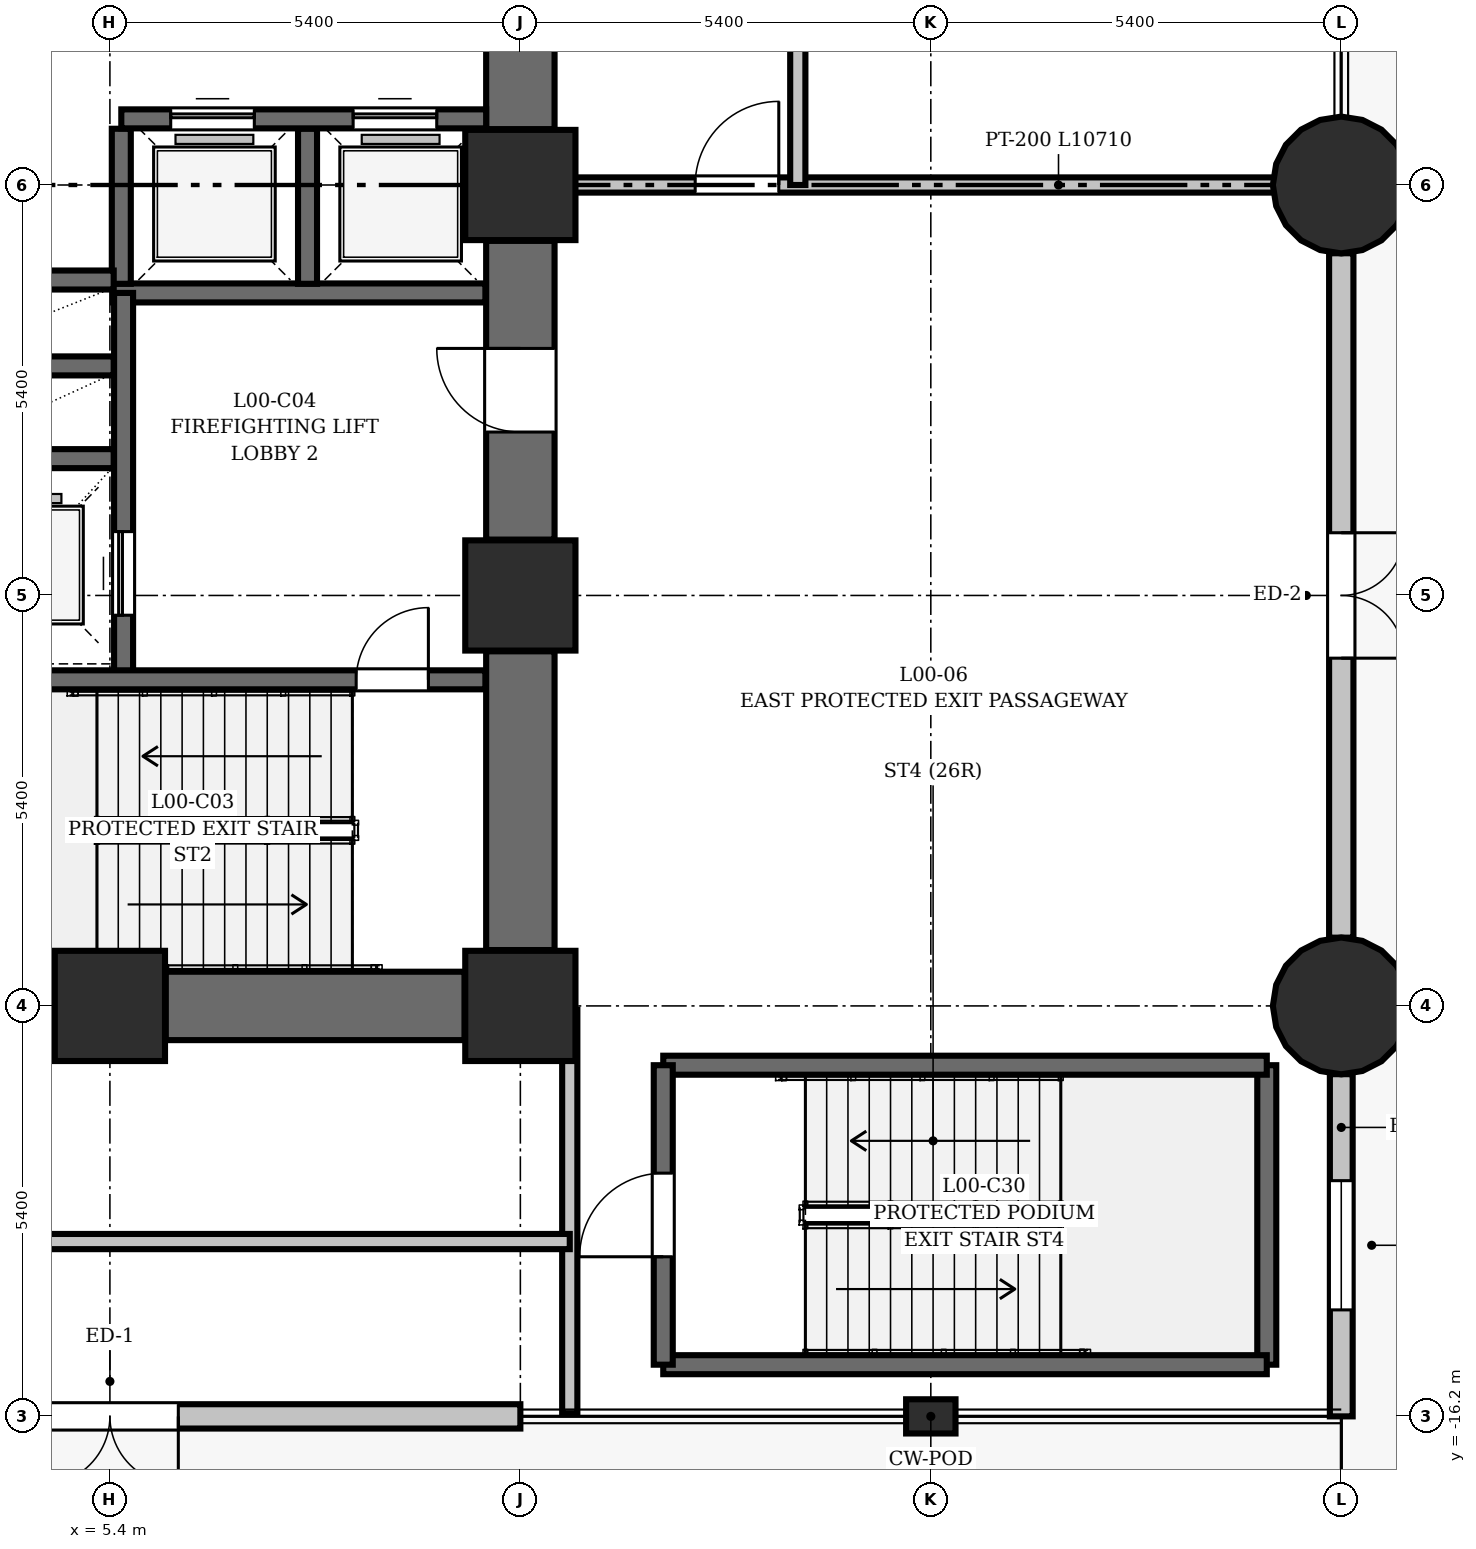
"""IFC4 building model, lengths in metres.
Left out: names, types, materials, properties, quantities, classifications, styles, units other than length and angle.
Written with IfcOpenShell. Run it as: python <this file> out.ifc"""

import sys

from ifc_helpers import new_model, si_unit, direction, frame, frame_2d, origin, origin_2d, place, context, subcontext, project, spatial, rectangle, circle, extrude, element, fill, save


model = new_model("IFC4")
c1 = context("Model", 3, precision=1e-05, world=origin(), true_north=direction((0.0, 1.0)))
c2 = subcontext(c1, "Body", "Model", "MODEL_VIEW")
j1 = project(units=[si_unit("LENGTHUNIT", "METRE"), si_unit("PLANEANGLEUNIT", "RADIAN")], contexts=[c1])
p1 = place(None, origin())
s1 = spatial("IfcSite", under=j1, at=p1, CompositionType="ELEMENT")
p2 = place(p1, origin())
s2 = spatial("IfcBuilding", under=s1, at=p2, CompositionType="ELEMENT")
p3 = place(p2, origin())
s3 = spatial("IfcBuildingStorey", under=s2, at=p3, CompositionType="ELEMENT", Elevation=0.0)
for number, where, z_axis, x_axis in (
    (1, (5.4, -10.8, 0.0), (0.0, 0.0, 1.0), (1.0, 0.0, 0.0)),
    (2, (10.8, -10.8, 0.0), (0.0, 0.0, 1.0), (1.0, 0.0, 0.0)),
    (3, (10.8, -5.4, 0.0), (0.0, 0.0, 1.0), (1.0, 0.0, 0.0)),
    (4, (10.8, 0.0, 0.0), (0.0, 0.0, 1.0), (1.0, 0.0, 0.0)),
):
    element("IfcColumn", number, at=place(p3, frame(where, z_axis=z_axis, x_axis=x_axis)), inside=s3, PredefinedType="COLUMN", context=c2, shape_type="SweptSolid", body=[
        extrude(rectangle(XDim=1.45, YDim=1.45, at=origin_2d()), origin(), (0.0, 0.0, 1.0), 4.5),
    ])
for number, where, z_axis, x_axis in (
    (5, (21.6, -10.8, 0.0), (0.0, 0.0, 1.0), (1.0, 0.0, 0.0)),
    (6, (21.6, 0.0, 0.0), (0.0, 0.0, 1.0), (1.0, 0.0, 0.0)),
):
    element("IfcColumn", number, at=place(p3, frame(where, z_axis=z_axis, x_axis=x_axis)), inside=s3, PredefinedType="COLUMN", context=c2, shape_type="SweptSolid", body=[
        extrude(circle(Radius=0.9, at=origin_2d()), origin(), (0.0, 0.0, 1.0), 4.5),
    ])
p4 = place(p3, frame((16.2, -16.2, 0.0), z_axis=(0.0, 0.0, 1.0), x_axis=(1.0, 0.0, 0.0)))
e7 = element("IfcColumn", 7, at=p4, inside=s3, PredefinedType="PILASTER", context=c2, shape_type="SweptSolid", body=[
    extrude(rectangle(XDim=0.65, YDim=0.45, at=origin_2d()), origin(), (0.0, 0.0, 1.0), 4.5),
])
p5 = place(p3, frame((10.8, -10.065, 0.0), z_axis=(0.0, 0.0, 1.0), x_axis=(0.0, 1.0, 0.0)))
e8 = element("IfcWall", 8, at=p5, inside=s3, PredefinedType="SHEAR", context=c2, shape_type="SweptSolid", body=[
    extrude(rectangle(XDim=3.93, YDim=0.9, at=frame_2d((1.965, 0.0))), origin(), (0.0, 0.0, 1.0), 4.5),
])
p6 = place(p3, frame((10.8, -4.665, 0.0), z_axis=(0.0, 0.0, 1.0), x_axis=(0.0, 1.0, 0.0)))
e9 = element("IfcWall", 9, at=p6, inside=s3, PredefinedType="SHEAR", context=c2, shape_type="SweptSolid", body=[
    extrude(rectangle(XDim=3.93, YDim=0.9, at=frame_2d((1.965, 0.0))), origin(), (0.0, 0.0, 1.0), 4.5),
])
p7 = place(p6, frame((1.415, 0.0, 0.0)))
e10 = element("IfcOpeningElement", 10, at=p7, cuts=e9, PredefinedType="OPENING", context=c2, shape_type="SweptSolid", body=[
    extrude(rectangle(XDim=1.1, YDim=2.1, at=frame_2d((0.55, 1.05))), frame((0.0, 0.46, 0.0), z_axis=(0.0, -1.0, 0.0), x_axis=(1.0, 0.0, 0.0)), (0.0, 0.0, 1.0), 0.92),
])
p8 = place(p3, frame((0.735, -10.8, 0.0), z_axis=(0.0, 0.0, 1.0), x_axis=(1.0, 0.0, 0.0)))
e11 = element("IfcWall", 11, at=p8, inside=s3, PredefinedType="SHEAR", context=c2, shape_type="SweptSolid", body=[
    extrude(rectangle(XDim=3.93, YDim=0.9, at=frame_2d((1.965, 0.0))), origin(), (0.0, 0.0, 1.0), 4.5),
])
p9 = place(p3, frame((10.8, 0.735, 0.0), z_axis=(0.0, 0.0, 1.0), x_axis=(0.0, 1.0, 0.0)))
e12 = element("IfcWall", 12, at=p9, inside=s3, PredefinedType="SHEAR", context=c2, shape_type="SweptSolid", body=[
    extrude(rectangle(XDim=3.93, YDim=0.9, at=frame_2d((1.965, 0.0))), origin(), (0.0, 0.0, 1.0), 4.5),
])
p10 = place(p9, frame((1.415, 0.0, 0.0)))
e13 = element("IfcOpeningElement", 13, at=p10, cuts=e12, PredefinedType="OPENING", context=c2, shape_type="SweptSolid", body=[
    extrude(rectangle(XDim=1.1, YDim=2.1, at=frame_2d((0.55, 1.05))), frame((0.0, 0.46, 0.0), z_axis=(0.0, -1.0, 0.0), x_axis=(1.0, 0.0, 0.0)), (0.0, 0.0, 1.0), 0.92),
])
p11 = place(p3, frame((6.135, -10.8, 0.0), z_axis=(0.0, 0.0, 1.0), x_axis=(1.0, 0.0, 0.0)))
e14 = element("IfcWall", 14, at=p11, inside=s3, PredefinedType="SHEAR", context=c2, shape_type="SweptSolid", body=[
    extrude(rectangle(XDim=3.93, YDim=0.9, at=frame_2d((1.965, 0.0))), origin(), (0.0, 0.0, 1.0), 4.5),
])
p12 = place(p3, frame((10.8, -16.2, 0.0), z_axis=(0.0, 0.0, 1.0), x_axis=(-1.0, 0.0, 0.0)))
e15 = element("IfcWall", 15, at=p12, inside=s3, PredefinedType="STANDARD", context=c2, shape_type="SweptSolid", body=[
    extrude(rectangle(XDim=10.8, YDim=0.32, at=frame_2d((5.4, 0.0))), origin(), (0.0, 0.0, 1.0), 3.329),
])
p13 = place(p12, frame((4.5, 0.0, 0.0)))
e16 = element("IfcOpeningElement", 16, at=p13, cuts=e15, PredefinedType="OPENING", context=c2, shape_type="SweptSolid", body=[
    extrude(rectangle(XDim=1.8, YDim=2.35, at=frame_2d((0.9, 1.175))), frame((0.0, 0.17, 0.0), z_axis=(0.0, -1.0, 0.0), x_axis=(1.0, 0.0, 0.0)), (0.0, 0.0, 1.0), 0.34),
])
p14 = place(p3, frame((21.6, -0.898, 0.0), z_axis=(0.0, 0.0, 1.0), x_axis=(0.0, -1.0, 0.0)))
e17 = element("IfcWall", 17, at=p14, inside=s3, PredefinedType="STANDARD", context=c2, shape_type="SweptSolid", body=[
    extrude(rectangle(XDim=9.004, YDim=0.32, at=frame_2d((4.502, 0.0))), origin(), (0.0, 0.0, 1.0), 3.329),
])
p15 = place(p14, frame((3.677, 0.0, 0.0)))
e18 = element("IfcOpeningElement", 18, at=p15, cuts=e17, PredefinedType="OPENING", context=c2, shape_type="SweptSolid", body=[
    extrude(rectangle(XDim=1.65, YDim=2.3, at=frame_2d((0.825, 1.15))), frame((0.0, 0.17, 0.0), z_axis=(0.0, -1.0, 0.0), x_axis=(1.0, 0.0, 0.0)), (0.0, 0.0, 1.0), 0.34),
])
p16 = place(p3, frame((21.6, -11.698, 0.0), z_axis=(0.0, 0.0, 1.0), x_axis=(0.0, -1.0, 0.0)))
e19 = element("IfcWall", 19, at=p16, inside=s3, PredefinedType="STANDARD", context=c2, shape_type="SweptSolid", body=[
    extrude(rectangle(XDim=4.502, YDim=0.3, at=frame_2d((2.251, 0.0))), origin(), (0.0, 0.0, 1.0), 3.329),
])
p17 = place(p16, frame((1.401, 0.0, 0.8)))
e20 = element("IfcOpeningElement", 20, at=p17, cuts=e19, PredefinedType="OPENING", context=c2, shape_type="SweptSolid", body=[
    extrude(rectangle(XDim=1.7, YDim=1.85, at=frame_2d((0.85, 0.925))), frame((0.0, 0.16, 0.0), z_axis=(0.0, -1.0, 0.0), x_axis=(1.0, 0.0, 0.0)), (0.0, 0.0, 1.0), 0.32),
])
p18 = place(p3, frame((5.44, -1.42, 0.0), z_axis=(0.0, 0.0, 1.0), x_axis=(1.0, 0.0, 0.0)))
e21 = element("IfcWall", 21, at=p18, inside=s3, PredefinedType="SHEAR", context=c2, shape_type="SweptSolid", body=[
    extrude(rectangle(XDim=4.9, YDim=0.25, at=frame_2d((2.45, 0.0))), origin(), (0.0, 0.0, 1.0), 4.5),
])
p19 = place(p3, frame((3.08, -3.6, 0.0), z_axis=(0.0, 0.0, 1.0), x_axis=(1.0, 0.0, 0.0)))
e22 = element("IfcWall", 22, at=p19, inside=s3, PredefinedType="SHEAR", context=c2, shape_type="SweptSolid", body=[
    extrude(rectangle(XDim=2.37, YDim=0.25, at=frame_2d((1.185, 0.0))), origin(), (0.0, 0.0, 1.0), 4.5),
])
p20 = place(p3, frame((5.58, -6.51, 0.0), z_axis=(0.0, 0.0, 1.0), x_axis=(0.0, 1.0, 0.0)))
e23 = element("IfcWall", 23, at=p20, inside=s3, PredefinedType="SHEAR", context=c2, shape_type="SweptSolid", body=[
    extrude(rectangle(XDim=5.09, YDim=0.25, at=frame_2d((2.545, 0.0))), origin(), (0.0, 0.0, 1.0), 4.5),
])
p21 = place(p20, frame((0.85, 0.0, 0.0)))
e24 = element("IfcOpeningElement", 24, at=p21, cuts=e23, PredefinedType="OPENING", context=c2, shape_type="SweptSolid", body=[
    extrude(rectangle(XDim=1.1, YDim=2.1, at=frame_2d((0.55, 1.05))), frame((0.0, 0.135, 0.0), z_axis=(0.0, -1.0, 0.0), x_axis=(1.0, 0.0, 0.0)), (0.0, 0.0, 1.0), 0.27),
])
for number, where, z_axis, x_axis in (
    (25, (5.55, -1.3, 0.0), (0.0, 0.0, 1.0), (0.0, 1.0, 0.0)),
    (26, (8.0, -1.3, 0.0), (0.0, 0.0, 1.0), (0.0, 1.0, 0.0)),
):
    element("IfcWall", number, at=place(p3, frame(where, z_axis=z_axis, x_axis=x_axis)), inside=s3, PredefinedType="SHEAR", context=c2, shape_type="SweptSolid", body=[
        extrude(rectangle(XDim=2.04, YDim=0.25, at=frame_2d((1.02, 0.0))), origin(), (0.0, 0.0, 1.0), 4.5),
    ])
p22 = place(p3, frame((5.55, 0.87, 0.0), z_axis=(0.0, 0.0, 1.0), x_axis=(1.0, 0.0, 0.0)))
e27 = element("IfcWall", 27, at=p22, inside=s3, PredefinedType="SHEAR", context=c2, shape_type="SweptSolid", body=[
    extrude(rectangle(XDim=4.8, YDim=0.25, at=frame_2d((2.4, 0.0))), origin(), (0.0, 0.0, 1.0), 4.5),
])
p23 = place(p22, frame((0.65, 0.0, 0.0)))
e28 = element("IfcOpeningElement", 28, at=p23, cuts=e27, PredefinedType="OPENING", context=c2, shape_type="SweptSolid", body=[
    extrude(rectangle(XDim=1.1, YDim=2.1, at=frame_2d((0.55, 1.05))), frame((0.0, 0.135, 0.0), z_axis=(0.0, -1.0, 0.0), x_axis=(1.0, 0.0, 0.0)), (0.0, 0.0, 1.0), 0.27),
])
p24 = place(p22, frame((3.05, 0.0, 0.0)))
e29 = element("IfcOpeningElement", 29, at=p24, cuts=e27, PredefinedType="OPENING", context=c2, shape_type="SweptSolid", body=[
    extrude(rectangle(XDim=1.1, YDim=2.1, at=frame_2d((0.55, 1.05))), frame((0.0, 0.135, 0.0), z_axis=(0.0, -1.0, 0.0), x_axis=(1.0, 0.0, 0.0)), (0.0, 0.0, 1.0), 0.27),
])
for number, where, z_axis, x_axis in (
    (30, (3.08, -2.38, 0.0), (0.0, 0.0, 1.0), (1.0, 0.0, 0.0)),
    (31, (3.08, -1.25, 0.0), (0.0, 0.0, 1.0), (1.0, 0.0, 0.0)),
):
    element("IfcWall", number, at=place(p3, frame(where, z_axis=z_axis, x_axis=x_axis)), inside=s3, PredefinedType="SHEAR", context=c2, shape_type="SweptSolid", body=[
        extrude(rectangle(XDim=2.37, YDim=0.25, at=frame_2d((1.185, 0.0))), origin(), (0.0, 0.0, 1.0), 4.5),
    ])
p25 = place(p3, frame((2.64, -6.51, 0.0), z_axis=(0.0, 0.0, 1.0), x_axis=(1.0, 0.0, 0.0)))
e32 = element("IfcWall", 32, at=p25, inside=s3, PredefinedType="SHEAR", context=c2, shape_type="SweptSolid", body=[
    extrude(rectangle(XDim=7.7, YDim=0.25, at=frame_2d((3.85, 0.0))), origin(), (0.0, 0.0, 1.0), 4.5),
])
p26 = place(p25, frame((6.0, 0.0, 0.0)))
e33 = element("IfcOpeningElement", 33, at=p26, cuts=e32, PredefinedType="OPENING", context=c2, shape_type="SweptSolid", body=[
    extrude(rectangle(XDim=0.95, YDim=2.1, at=frame_2d((0.475, 1.05))), frame((0.0, 0.135, 0.0), z_axis=(0.0, -1.0, 0.0), x_axis=(1.0, 0.0, 0.0)), (0.0, 0.0, 1.0), 0.27),
])
p27 = place(p3, frame((20.62, -15.52, 0.0), z_axis=(0.0, 0.0, 1.0), x_axis=(0.0, 1.0, 0.0)))
e34 = element("IfcWall", 34, at=p27, inside=s3, PredefinedType="SHEAR", context=c2, shape_type="SweptSolid", body=[
    extrude(rectangle(XDim=3.94, YDim=0.25, at=frame_2d((1.97, 0.0))), origin(), (0.0, 0.0, 1.0), 4.5),
])
for number, where, z_axis, x_axis in (
    (35, (12.68, -11.58, 0.0), (0.0, 0.0, 1.0), (1.0, 0.0, 0.0)),
    (36, (12.68, -15.52, 0.0), (0.0, 0.0, 1.0), (1.0, 0.0, 0.0)),
):
    element("IfcWall", number, at=place(p3, frame(where, z_axis=z_axis, x_axis=x_axis)), inside=s3, PredefinedType="SHEAR", context=c2, shape_type="SweptSolid", body=[
        extrude(rectangle(XDim=7.94, YDim=0.25, at=frame_2d((3.97, 0.0))), origin(), (0.0, 0.0, 1.0), 4.5),
    ])
p28 = place(p3, frame((12.68, -15.52, 0.0), z_axis=(0.0, 0.0, 1.0), x_axis=(0.0, 1.0, 0.0)))
e37 = element("IfcWall", 37, at=p28, inside=s3, PredefinedType="SHEAR", context=c2, shape_type="SweptSolid", body=[
    extrude(rectangle(XDim=3.94, YDim=0.25, at=frame_2d((1.97, 0.0))), origin(), (0.0, 0.0, 1.0), 4.5),
])
p29 = place(p28, frame((1.42, 0.0, 0.0)))
e38 = element("IfcOpeningElement", 38, at=p29, cuts=e37, PredefinedType="OPENING", context=c2, shape_type="SweptSolid", body=[
    extrude(rectangle(XDim=1.1, YDim=2.1, at=frame_2d((0.55, 1.05))), frame((0.0, 0.135, 0.0), z_axis=(0.0, -1.0, 0.0), x_axis=(1.0, 0.0, 0.0)), (0.0, 0.0, 1.0), 0.27),
])
p30 = place(p3, frame((10.85, 0.0, 0.0), z_axis=(0.0, 0.0, 1.0), x_axis=(1.0, 0.0, 0.0)))
e39 = element("IfcWall", 39, at=p30, inside=s3, PredefinedType="PARTITIONING", context=c2, shape_type="SweptSolid", body=[
    extrude(rectangle(XDim=10.71, YDim=0.2, at=frame_2d((5.355, 0.0))), origin(), (0.0, 0.0, 1.0), 2.205),
])
p31 = place(p30, frame((2.25, 0.0, 0.0)))
e40 = element("IfcOpeningElement", 40, at=p31, cuts=e39, PredefinedType="OPENING", context=c2, shape_type="SweptSolid", body=[
    extrude(rectangle(XDim=1.1, YDim=2.1, at=frame_2d((0.55, 1.05))), frame((0.0, 0.11, 0.0), z_axis=(0.0, -1.0, 0.0), x_axis=(1.0, 0.0, 0.0)), (0.0, 0.0, 1.0), 0.22),
])
p32 = place(p3, frame((11.45, -16.16, 0.0), z_axis=(0.0, 0.0, 1.0), x_axis=(0.0, 1.0, 0.0)))
e41 = element("IfcWall", 41, at=p32, inside=s3, PredefinedType="PARTITIONING", context=c2, shape_type="SweptSolid", body=[
    extrude(rectangle(XDim=5.31, YDim=0.2, at=frame_2d((2.655, 0.0))), origin(), (0.0, 0.0, 1.0), 3.329),
])
p33 = place(p3, frame((14.45, 0.0, 0.0), z_axis=(0.0, 0.0, 1.0), x_axis=(0.0, 1.0, 0.0)))
e42 = element("IfcWall", 42, at=p33, inside=s3, PredefinedType="PARTITIONING", context=c2, shape_type="SweptSolid", body=[
    extrude(rectangle(XDim=13.9, YDim=0.2, at=frame_2d((6.95, 0.0))), origin(), (0.0, 0.0, 1.0), 3.329),
])
p34 = place(p33, frame((2.5, 0.0, 0.0)))
e43 = element("IfcOpeningElement", 43, at=p34, cuts=e42, PredefinedType="OPENING", context=c2, shape_type="SweptSolid", body=[
    extrude(rectangle(XDim=1.1, YDim=2.1, at=frame_2d((0.55, 1.05))), frame((0.0, 0.11, 0.0), z_axis=(0.0, -1.0, 0.0), x_axis=(1.0, 0.0, 0.0)), (0.0, 0.0, 1.0), 0.22),
])
p35 = place(p33, frame((9.5, 0.0, 0.0)))
e44 = element("IfcOpeningElement", 44, at=p35, cuts=e42, PredefinedType="OPENING", context=c2, shape_type="SweptSolid", body=[
    extrude(rectangle(XDim=1.1, YDim=2.1, at=frame_2d((0.55, 1.05))), frame((0.0, 0.11, 0.0), z_axis=(0.0, -1.0, 0.0), x_axis=(1.0, 0.0, 0.0)), (0.0, 0.0, 1.0), 0.22),
])
p36 = place(p3, frame((-14.45, -13.9, 0.0), z_axis=(0.0, 0.0, 1.0), x_axis=(1.0, 0.0, 0.0)))
e45 = element("IfcWall", 45, at=p36, inside=s3, PredefinedType="PARTITIONING", context=c2, shape_type="SweptSolid", body=[
    extrude(rectangle(XDim=25.9, YDim=0.2, at=frame_2d((12.95, 0.0))), origin(), (0.0, 0.0, 1.0), 3.329),
])
p37 = place(p36, frame((11.0, 0.0, 0.0)))
e46 = element("IfcOpeningElement", 46, at=p37, cuts=e45, PredefinedType="OPENING", context=c2, shape_type="SweptSolid", body=[
    extrude(rectangle(XDim=1.1, YDim=2.1, at=frame_2d((0.55, 1.05))), frame((0.0, 0.11, 0.0), z_axis=(0.0, -1.0, 0.0), x_axis=(1.0, 0.0, 0.0)), (0.0, 0.0, 1.0), 0.22),
])
p38 = place(p13, origin())
e47 = element("IfcDoor", 47, at=p38, inside=s3, OperationType="DOUBLE_DOOR_SINGLE_SWING", PredefinedType="DOOR", context=c2, shape_type="SweptSolid", body=[
    extrude(rectangle(XDim=1.8, YDim=2.35, at=frame_2d((0.9, 1.175))), frame((0.0, 0.025, 0.0), z_axis=(0.0, -1.0, 0.0), x_axis=(1.0, 0.0, 0.0)), (0.0, 0.0, 1.0), 0.05),
])
fill(e16, e47)
p39 = place(p15, origin())
e48 = element("IfcDoor", 48, at=p39, inside=s3, OperationType="DOUBLE_DOOR_SINGLE_SWING", PredefinedType="DOOR", context=c2, shape_type="SweptSolid", body=[
    extrude(rectangle(XDim=1.65, YDim=2.3, at=frame_2d((0.825, 1.15))), frame((0.0, 0.025, 0.0), z_axis=(0.0, -1.0, 0.0), x_axis=(1.0, 0.0, 0.0)), (0.0, 0.0, 1.0), 0.05),
])
fill(e18, e48)
p40 = place(p17, origin())
e49 = element("IfcWindow", 49, at=p40, inside=s3, PartitioningType="SINGLE_PANEL", PredefinedType="WINDOW", context=c2, shape_type="SweptSolid", body=[
    extrude(rectangle(XDim=1.7, YDim=1.85, at=frame_2d((0.85, 0.925))), frame((0.0, 0.03, 0.0), z_axis=(0.0, -1.0, 0.0), x_axis=(1.0, 0.0, 0.0)), (0.0, 0.0, 1.0), 0.06),
])
fill(e20, e49)
p41 = place(p26, origin())
e50 = element("IfcDoor", 50, at=p41, inside=s3, OperationType="SINGLE_SWING_RIGHT", PredefinedType="DOOR", context=c2, shape_type="SweptSolid", body=[
    extrude(rectangle(XDim=0.95, YDim=2.1, at=frame_2d((0.475, 1.05))), frame((0.0, 0.025, 0.0), z_axis=(0.0, -1.0, 0.0), x_axis=(1.0, 0.0, 0.0)), (0.0, 0.0, 1.0), 0.05),
])
fill(e33, e50)
p42 = place(p7, origin())
e51 = element("IfcDoor", 51, at=p42, inside=s3, OperationType="SINGLE_SWING_RIGHT", PredefinedType="DOOR", context=c2, shape_type="SweptSolid", body=[
    extrude(rectangle(XDim=1.1, YDim=2.1, at=frame_2d((0.55, 1.05))), frame((0.0, 0.025, 0.0), z_axis=(0.0, -1.0, 0.0), x_axis=(1.0, 0.0, 0.0)), (0.0, 0.0, 1.0), 0.05),
])
fill(e10, e51)
p43 = place(p21, origin())
e52 = element("IfcDoor", 52, at=p43, inside=s3, OperationType="SLIDING_TO_RIGHT", PredefinedType="DOOR", context=c2, shape_type="SweptSolid", body=[
    extrude(rectangle(XDim=1.1, YDim=2.1, at=frame_2d((0.55, 1.05))), frame((0.0, 0.025, 0.0), z_axis=(0.0, -1.0, 0.0), x_axis=(1.0, 0.0, 0.0)), (0.0, 0.0, 1.0), 0.05),
])
fill(e24, e52)
p44 = place(p23, origin())
e53 = element("IfcDoor", 53, at=p44, inside=s3, OperationType="SLIDING_TO_RIGHT", PredefinedType="DOOR", context=c2, shape_type="SweptSolid", body=[
    extrude(rectangle(XDim=1.1, YDim=2.1, at=frame_2d((0.55, 1.05))), frame((0.0, 0.025, 0.0), z_axis=(0.0, -1.0, 0.0), x_axis=(1.0, 0.0, 0.0)), (0.0, 0.0, 1.0), 0.05),
])
fill(e28, e53)
p45 = place(p24, origin())
e54 = element("IfcDoor", 54, at=p45, inside=s3, OperationType="SLIDING_TO_RIGHT", PredefinedType="DOOR", context=c2, shape_type="SweptSolid", body=[
    extrude(rectangle(XDim=1.1, YDim=2.1, at=frame_2d((0.55, 1.05))), frame((0.0, 0.025, 0.0), z_axis=(0.0, -1.0, 0.0), x_axis=(1.0, 0.0, 0.0)), (0.0, 0.0, 1.0), 0.05),
])
fill(e29, e54)
p46 = place(p29, origin())
e55 = element("IfcDoor", 55, at=p46, inside=s3, OperationType="SINGLE_SWING_LEFT", PredefinedType="DOOR", context=c2, shape_type="SweptSolid", body=[
    extrude(rectangle(XDim=1.1, YDim=2.1, at=frame_2d((0.55, 1.05))), frame((0.0, 0.025, 0.0), z_axis=(0.0, -1.0, 0.0), x_axis=(1.0, 0.0, 0.0)), (0.0, 0.0, 1.0), 0.05),
])
fill(e38, e55)
p47 = place(p31, origin())
e56 = element("IfcDoor", 56, at=p47, inside=s3, OperationType="SINGLE_SWING_RIGHT", PredefinedType="DOOR", context=c2, shape_type="SweptSolid", body=[
    extrude(rectangle(XDim=1.1, YDim=2.1, at=frame_2d((0.55, 1.05))), frame((0.0, 0.025, 0.0), z_axis=(0.0, -1.0, 0.0), x_axis=(1.0, 0.0, 0.0)), (0.0, 0.0, 1.0), 0.05),
])
fill(e40, e56)
save(model, sys.argv[1])
